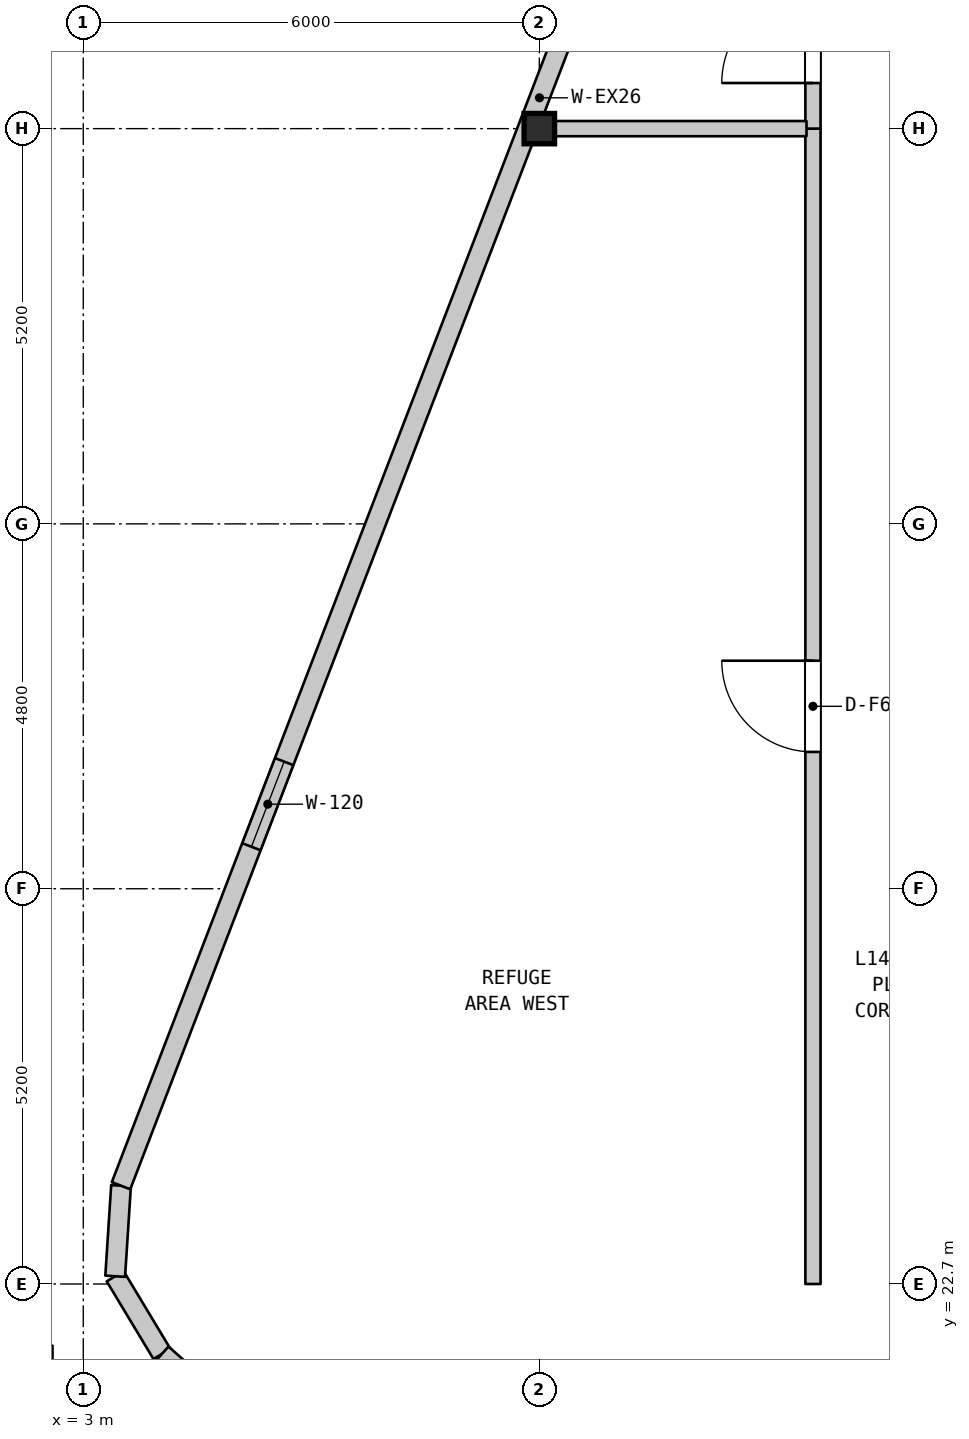
"""IFC4 building model, lengths in metres.
Left out: names, types, materials, properties, quantities, classifications, styles, units other than length and angle.
Written with IfcOpenShell. Run it as: python <this file> out.ifc"""

import sys

from ifc_helpers import new_model, si_unit, direction, frame, frame_2d, origin, origin_2d, place, context, subcontext, project, spatial, rectangle, i_section, extrude, element, fill, save


model = new_model("IFC4")
c1 = context("Model", 3, precision=1e-05, world=origin(), true_north=direction((0.0, 1.0)))
c2 = subcontext(c1, "Body", "Model", "MODEL_VIEW")
j1 = project(units=[si_unit("LENGTHUNIT", "METRE"), si_unit("PLANEANGLEUNIT", "RADIAN")], contexts=[c1])
p1 = place(None, origin())
s1 = spatial("IfcSite", under=j1, at=p1, CompositionType="ELEMENT")
p2 = place(p1, origin())
s2 = spatial("IfcBuilding", under=s1, at=p2, CompositionType="ELEMENT")
p3 = place(p2, frame((0.0, 0.0, 61.0)))
s3 = spatial("IfcBuildingStorey", under=s2, at=p3, CompositionType="ELEMENT", Elevation=61.0)
p4 = place(p3, frame((9.0, 37.9, 0.0), z_axis=(0.0, 0.0, 1.0), x_axis=(1.0, 0.0, 0.0)))
e1 = element("IfcColumn", 1, at=p4, inside=s3, PredefinedType="COLUMN", context=c2, shape_type="SweptSolid", body=[
    extrude(i_section(OverallWidth=0.401, OverallDepth=0.399, WebThickness=0.025, FlangeThickness=0.04, FilletRadius=0.015, at=origin_2d()), origin(), (0.0, 0.0, 1.0), 4.6),
])
p5 = place(p3, frame((4.035, 21.78, 0.0), z_axis=(0.0, 0.0, 1.0), x_axis=(-0.51560906497, 0.856823956318, 0.0)))
e2 = element("IfcWall", 2, at=p5, inside=s3, PredefinedType="STANDARD", context=c2, shape_type="SweptSolid", body=[
    extrude(rectangle(XDim=1.193, YDim=0.26, at=frame_2d((0.596, 0.0))), origin(), (0.0, 0.0, 1.0), 4.28),
])
p6 = place(p3, frame((3.42, 22.802, 0.0), z_axis=(0.0, 0.0, 1.0), x_axis=(0.064645147091, 0.997908314906, 0.0)))
e3 = element("IfcWall", 3, at=p6, inside=s3, PredefinedType="STANDARD", context=c2, shape_type="SweptSolid", body=[
    extrude(rectangle(XDim=1.193, YDim=0.26, at=frame_2d((0.597, 0.0))), origin(), (0.0, 0.0, 1.0), 4.28),
])
p7 = place(p3, frame((3.497, 23.993, 0.0), z_axis=(0.0, 0.0, 1.0), x_axis=(0.358990281293, 0.93334129767, 0.0)))
e4 = element("IfcWall", 4, at=p7, inside=s3, PredefinedType="STANDARD", context=c2, shape_type="SweptSolid", body=[
    extrude(rectangle(XDim=30.669, YDim=0.26, at=frame_2d((15.335, 0.0))), origin(), (0.0, 0.0, 1.0), 4.28),
])
p8 = place(p7, frame((4.778, 0.0, 1.1)))
e5 = element("IfcOpeningElement", 5, at=p8, cuts=e4, PredefinedType="OPENING", context=c2, shape_type="SweptSolid", body=[
    extrude(rectangle(XDim=1.2, YDim=1.4, at=frame_2d((0.6, 0.7))), frame((0.0, 0.14, 0.0), z_axis=(0.0, -1.0, 0.0), x_axis=(1.0, 0.0, 0.0)), (0.0, 0.0, 1.0), 0.28),
])
p9 = place(p7, frame((24.691, 0.0, 1.1)))
e6 = element("IfcOpeningElement", 6, at=p9, cuts=e4, PredefinedType="OPENING", context=c2, shape_type="SweptSolid", body=[
    extrude(rectangle(XDim=1.2, YDim=1.4, at=frame_2d((0.6, 0.7))), frame((0.0, 0.14, 0.0), z_axis=(0.0, -1.0, 0.0), x_axis=(1.0, 0.0, 0.0)), (0.0, 0.0, 1.0), 0.28),
])
p10 = place(p3, frame((12.6, 22.7, 0.0), z_axis=(0.0, 0.0, 1.0), x_axis=(0.0, 1.0, 0.0)))
e7 = element("IfcWall", 7, at=p10, inside=s3, PredefinedType="STANDARD", context=c2, shape_type="SweptSolid", body=[
    extrude(rectangle(XDim=15.2, YDim=0.2, at=frame_2d((7.6, 0.0))), origin(), (0.0, 0.0, 1.0), 4.28),
])
p11 = place(p10, frame((7.0, 0.0, 0.0)))
e8 = element("IfcOpeningElement", 8, at=p11, cuts=e7, PredefinedType="OPENING", context=c2, shape_type="SweptSolid", body=[
    extrude(rectangle(XDim=1.2, YDim=2.2, at=frame_2d((0.6, 1.1))), frame((0.0, 0.11, 0.0), z_axis=(0.0, -1.0, 0.0), x_axis=(1.0, 0.0, 0.0)), (0.0, 0.0, 1.0), 0.22),
])
p12 = place(p3, frame((12.6, 37.9, 0.0), z_axis=(0.0, 0.0, 1.0), x_axis=(0.0, 1.0, 0.0)))
e9 = element("IfcWall", 9, at=p12, inside=s3, PredefinedType="STANDARD", context=c2, shape_type="SweptSolid", body=[
    extrude(rectangle(XDim=2.4, YDim=0.2, at=frame_2d((1.2, 0.0))), origin(), (0.0, 0.0, 1.0), 4.28),
])
p13 = place(p12, frame((0.6, 0.0, 0.0)))
e10 = element("IfcOpeningElement", 10, at=p13, cuts=e9, PredefinedType="OPENING", context=c2, shape_type="SweptSolid", body=[
    extrude(rectangle(XDim=1.2, YDim=2.2, at=frame_2d((0.6, 1.1))), frame((0.0, 0.11, 0.0), z_axis=(0.0, -1.0, 0.0), x_axis=(1.0, 0.0, 0.0)), (0.0, 0.0, 1.0), 0.22),
])
p14 = place(p3, frame((8.856, 37.9, 0.0), z_axis=(0.0, 0.0, 1.0), x_axis=(1.0, 0.0, 0.0)))
e11 = element("IfcWall", 11, at=p14, inside=s3, PredefinedType="STANDARD", context=c2, shape_type="SweptSolid", body=[
    extrude(rectangle(XDim=3.659, YDim=0.2, at=frame_2d((1.83, 0.0))), origin(), (0.0, 0.0, 1.0), 3.78),
])
p15 = place(p3, frame((17.439, 9.865, 0.0), z_axis=(0.0, 0.0, 1.0), x_axis=(-0.747407065455, 0.664366373703, 0.0)))
e12 = element("IfcWall", 12, at=p15, inside=s3, PredefinedType="STANDARD", context=c2, shape_type="SweptSolid", body=[
    extrude(rectangle(XDim=17.934, YDim=0.26, at=frame_2d((8.967, 0.0))), origin(), (0.0, 0.0, 1.0), 4.28),
])
p16 = place(p15, frame((0.51, 0.0, 1.1)))
e13 = element("IfcOpeningElement", 13, at=p16, cuts=e12, PredefinedType="OPENING", context=c2, shape_type="SweptSolid", body=[
    extrude(rectangle(XDim=1.2, YDim=1.4, at=frame_2d((0.6, 0.7))), frame((0.0, 0.14, 0.0), z_axis=(0.0, -1.0, 0.0), x_axis=(1.0, 0.0, 0.0)), (0.0, 0.0, 1.0), 0.28),
])
p17 = place(p8, origin())
e14 = element("IfcWindow", 14, at=p17, inside=s3, PartitioningType="SINGLE_PANEL", PredefinedType="WINDOW", context=c2, shape_type="SweptSolid", body=[
    extrude(rectangle(XDim=1.2, YDim=1.4, at=frame_2d((0.6, 0.7))), frame((0.0, 0.03, 0.0), z_axis=(0.0, -1.0, 0.0), x_axis=(1.0, 0.0, 0.0)), (0.0, 0.0, 1.0), 0.06),
])
fill(e5, e14)
p18 = place(p11, origin())
e15 = element("IfcDoor", 15, at=p18, inside=s3, OperationType="SINGLE_SWING_RIGHT", PredefinedType="DOOR", context=c2, shape_type="SweptSolid", body=[
    extrude(rectangle(XDim=1.2, YDim=2.2, at=frame_2d((0.6, 1.1))), frame((0.0, 0.025, 0.0), z_axis=(0.0, -1.0, 0.0), x_axis=(1.0, 0.0, 0.0)), (0.0, 0.0, 1.0), 0.05),
])
fill(e8, e15)
p19 = place(p13, origin())
e16 = element("IfcDoor", 16, at=p19, inside=s3, OperationType="SINGLE_SWING_LEFT", PredefinedType="DOOR", context=c2, shape_type="SweptSolid", body=[
    extrude(rectangle(XDim=1.2, YDim=2.2, at=frame_2d((0.6, 1.1))), frame((0.0, 0.025, 0.0), z_axis=(0.0, -1.0, 0.0), x_axis=(1.0, 0.0, 0.0)), (0.0, 0.0, 1.0), 0.05),
])
fill(e10, e16)
save(model, sys.argv[1])
